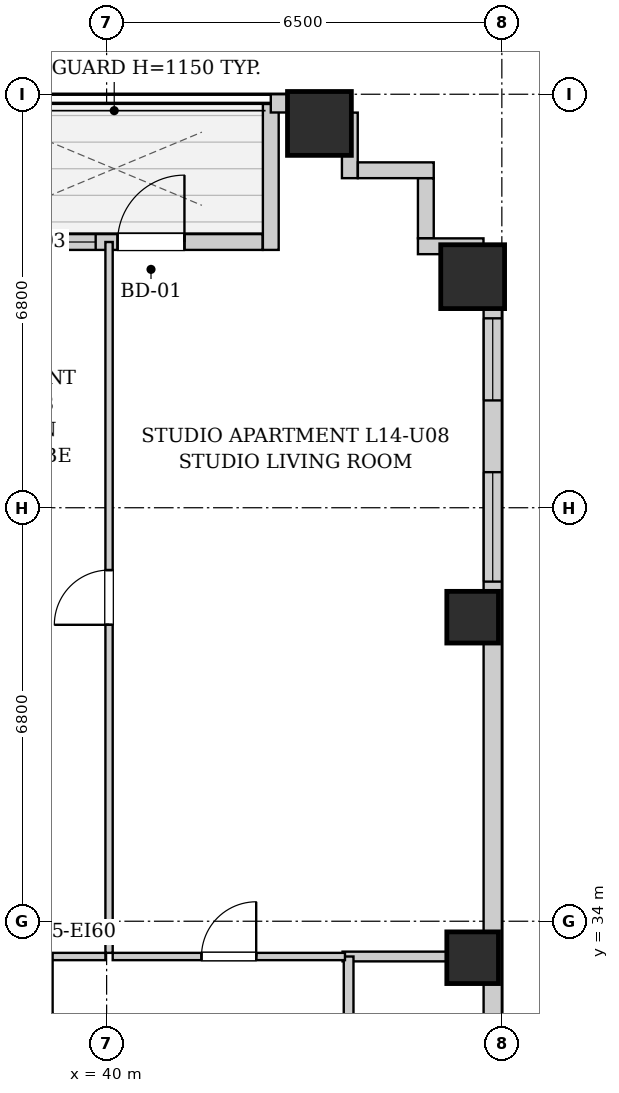
"""IFC4 building model, lengths in metres.
Left out: names, types, materials, properties, quantities, classifications, styles, units other than length and angle.
Written with IfcOpenShell. Run it as: python <this file> out.ifc"""

import sys

from ifc_helpers import new_model, si_unit, direction, frame, frame_2d, origin, origin_2d, place, context, subcontext, project, spatial, rectangle, extrude, element, fill, save


model = new_model("IFC4")
c1 = context("Model", 3, precision=1e-05, world=origin(), true_north=direction((0.0, 1.0)))
c2 = subcontext(c1, "Body", "Model", "MODEL_VIEW")
j1 = project(units=[si_unit("LENGTHUNIT", "METRE"), si_unit("PLANEANGLEUNIT", "RADIAN")], contexts=[c1])
p1 = place(None, origin())
s1 = spatial("IfcSite", under=j1, at=p1, CompositionType="ELEMENT")
p2 = place(p1, origin())
s2 = spatial("IfcBuilding", under=s1, at=p2, CompositionType="ELEMENT")
p3 = place(p2, frame((0.0, 0.0, 54.6)))
s3 = spatial("IfcBuildingStorey", under=s2, at=p3, CompositionType="ELEMENT", Elevation=54.6)
p4 = place(p3, frame((43.5, 47.12, 0.0), z_axis=(0.0, 0.0, 1.0), x_axis=(1.0, 0.0, 0.0)))
e1 = element("IfcColumn", 1, at=p4, inside=s3, PredefinedType="COLUMN", context=c2, shape_type="SweptSolid", body=[
    extrude(rectangle(XDim=1.05, YDim=1.05, at=origin_2d()), origin(), (0.0, 0.0, 1.0), 3.2),
])
for number, where, z_axis, x_axis in (
    (2, (46.02, 33.4, 0.0), (0.0, 0.0, 1.0), (1.0, 0.0, 0.0)),
    (3, (46.02, 39.0, 0.0), (0.0, 0.0, 1.0), (1.0, 0.0, 0.0)),
):
    element("IfcColumn", number, at=place(p3, frame(where, z_axis=z_axis, x_axis=x_axis)), inside=s3, PredefinedType="COLUMN", context=c2, shape_type="SweptSolid", body=[
        extrude(rectangle(XDim=0.85, YDim=0.85, at=origin_2d()), origin(), (0.0, 0.0, 1.0), 3.2),
    ])
p5 = place(p3, frame((46.02, 44.6, 0.0), z_axis=(0.0, 0.0, 1.0), x_axis=(1.0, 0.0, 0.0)))
e4 = element("IfcColumn", 4, at=p5, inside=s3, PredefinedType="COLUMN", context=c2, shape_type="SweptSolid", body=[
    extrude(rectangle(XDim=1.05, YDim=1.05, at=origin_2d()), origin(), (0.0, 0.0, 1.0), 3.2),
])
p6 = place(p3, frame((37.684, 45.17, 0.0), z_axis=(0.0, 0.0, 1.0), x_axis=(1.0, 0.0, 0.0)))
e5 = element("IfcWall", 5, at=p6, inside=s3, PredefinedType="SOLIDWALL", context=c2, shape_type="SweptSolid", body=[
    extrude(rectangle(XDim=4.882, YDim=0.26, at=frame_2d((2.441, 0.0))), origin(), (0.0, 0.0, 1.0), 2.94),
])
p7 = place(p6, frame((2.496, 0.0, 0.0)))
e6 = element("IfcOpeningElement", 6, at=p7, cuts=e5, PredefinedType="OPENING", context=c2, shape_type="SweptSolid", body=[
    extrude(rectangle(XDim=1.1, YDim=2.0, at=frame_2d((0.55, 1.0))), frame((0.0, 0.14, 0.0), z_axis=(0.0, -1.0, 0.0), x_axis=(1.0, 0.0, 0.0)), (0.0, 0.0, 1.0), 0.28),
])
p8 = place(p6, frame((0.336, 0.0, 0.85)))
e7 = element("IfcOpeningElement", 7, at=p8, cuts=e5, PredefinedType="OPENING", context=c2, shape_type="SweptSolid", body=[
    extrude(rectangle(XDim=1.8, YDim=1.65, at=frame_2d((0.9, 0.825))), frame((0.0, 0.14, 0.0), z_axis=(0.0, -1.0, 0.0), x_axis=(1.0, 0.0, 0.0)), (0.0, 0.0, 1.0), 0.28),
])
p9 = place(p3, frame((42.7, 45.04, 0.0), z_axis=(0.0, 0.0, 1.0), x_axis=(0.0, 1.0, 0.0)))
e8 = element("IfcWall", 8, at=p9, inside=s3, PredefinedType="SOLIDWALL", context=c2, shape_type="SweptSolid", body=[
    extrude(rectangle(XDim=2.4, YDim=0.26, at=frame_2d((1.2, 0.0))), origin(), (0.0, 0.0, 1.0), 2.94),
])
p10 = place(p3, frame((42.7, 47.45, 0.0), z_axis=(0.0, 0.0, 1.0), x_axis=(1.0, 0.0, 0.0)))
e9 = element("IfcWall", 9, at=p10, inside=s3, PredefinedType="SOLIDWALL", context=c2, shape_type="SweptSolid", body=[
    extrude(rectangle(XDim=1.3, YDim=0.3, at=frame_2d((0.65, 0.0))), origin(), (0.0, 0.0, 1.0), 1.975),
])
p11 = place(p3, frame((46.35, 45.1, 0.0), z_axis=(0.0, 0.0, 1.0), x_axis=(0.0, -1.0, 0.0)))
e10 = element("IfcWall", 10, at=p11, inside=s3, PredefinedType="SOLIDWALL", context=c2, shape_type="SweptSolid", body=[
    extrude(rectangle(XDim=42.6, YDim=0.3, at=frame_2d((21.3, 0.0))), origin(), (0.0, 0.0, 1.0), 1.975),
])
p12 = place(p11, frame((37.575, 0.0, 0.55)))
e11 = element("IfcOpeningElement", 11, at=p12, cuts=e10, PredefinedType="OPENING", context=c2, shape_type="SweptSolid", body=[
    extrude(rectangle(XDim=1.8, YDim=1.2, at=frame_2d((0.9, 0.6))), frame((0.0, 0.16, 0.0), z_axis=(0.0, -1.0, 0.0), x_axis=(1.0, 0.0, 0.0)), (0.0, 0.0, 1.0), 0.32),
])
p13 = place(p11, frame((34.85, 0.0, 0.55)))
e12 = element("IfcOpeningElement", 12, at=p13, cuts=e10, PredefinedType="OPENING", context=c2, shape_type="SweptSolid", body=[
    extrude(rectangle(XDim=1.35, YDim=1.2, at=frame_2d((0.675, 0.6))), frame((0.0, 0.16, 0.0), z_axis=(0.0, -1.0, 0.0), x_axis=(1.0, 0.0, 0.0)), (0.0, 0.0, 1.0), 0.32),
])
p14 = place(p11, frame((3.715, 0.0, 0.55)))
e13 = element("IfcOpeningElement", 13, at=p14, cuts=e10, PredefinedType="OPENING", context=c2, shape_type="SweptSolid", body=[
    extrude(rectangle(XDim=1.8, YDim=1.2, at=frame_2d((0.9, 0.6))), frame((0.0, 0.16, 0.0), z_axis=(0.0, -1.0, 0.0), x_axis=(1.0, 0.0, 0.0)), (0.0, 0.0, 1.0), 0.32),
])
p15 = place(p11, frame((1.185, 0.0, 0.55)))
e14 = element("IfcOpeningElement", 14, at=p15, cuts=e10, PredefinedType="OPENING", context=c2, shape_type="SweptSolid", body=[
    extrude(rectangle(XDim=1.35, YDim=1.2, at=frame_2d((0.675, 0.6))), frame((0.0, 0.16, 0.0), z_axis=(0.0, -1.0, 0.0), x_axis=(1.0, 0.0, 0.0)), (0.0, 0.0, 1.0), 0.32),
])
p16 = place(p11, frame((26.025, 0.0, 0.55)))
e15 = element("IfcOpeningElement", 15, at=p16, cuts=e10, PredefinedType="OPENING", context=c2, shape_type="SweptSolid", body=[
    extrude(rectangle(XDim=1.8, YDim=1.2, at=frame_2d((0.9, 0.6))), frame((0.0, 0.16, 0.0), z_axis=(0.0, -1.0, 0.0), x_axis=(1.0, 0.0, 0.0)), (0.0, 0.0, 1.0), 0.32),
])
p17 = place(p11, frame((28.085, 0.0, 0.55)))
e16 = element("IfcOpeningElement", 16, at=p17, cuts=e10, PredefinedType="OPENING", context=c2, shape_type="SweptSolid", body=[
    extrude(rectangle(XDim=1.35, YDim=1.2, at=frame_2d((0.675, 0.6))), frame((0.0, 0.16, 0.0), z_axis=(0.0, -1.0, 0.0), x_axis=(1.0, 0.0, 0.0)), (0.0, 0.0, 1.0), 0.32),
])
p18 = place(p11, frame((18.8, 0.0, 0.55)))
e17 = element("IfcOpeningElement", 17, at=p18, cuts=e10, PredefinedType="OPENING", context=c2, shape_type="SweptSolid", body=[
    extrude(rectangle(XDim=1.8, YDim=1.2, at=frame_2d((0.9, 0.6))), frame((0.0, 0.16, 0.0), z_axis=(0.0, -1.0, 0.0), x_axis=(1.0, 0.0, 0.0)), (0.0, 0.0, 1.0), 0.32),
])
p19 = place(p11, frame((16.685, 0.0, 0.55)))
e18 = element("IfcOpeningElement", 18, at=p19, cuts=e10, PredefinedType="OPENING", context=c2, shape_type="SweptSolid", body=[
    extrude(rectangle(XDim=1.35, YDim=1.2, at=frame_2d((0.675, 0.6))), frame((0.0, 0.16, 0.0), z_axis=(0.0, -1.0, 0.0), x_axis=(1.0, 0.0, 0.0)), (0.0, 0.0, 1.0), 0.32),
])
p20 = place(p3, frame((44.0, 47.298, 0.0), z_axis=(0.0, 0.0, 1.0), x_axis=(0.0, -1.0, 0.0)))
e19 = element("IfcWall", 19, at=p20, inside=s3, PredefinedType="SOLIDWALL", context=c2, shape_type="SweptSolid", body=[
    extrude(rectangle(XDim=1.078, YDim=0.26, at=frame_2d((0.539, 0.0))), origin(), (0.0, 0.0, 1.0), 2.94),
])
p21 = place(p3, frame((44.132, 46.35, 0.0), z_axis=(0.0, 0.0, 1.0), x_axis=(1.0, 0.0, 0.0)))
e20 = element("IfcWall", 20, at=p21, inside=s3, PredefinedType="SOLIDWALL", context=c2, shape_type="SweptSolid", body=[
    extrude(rectangle(XDim=1.248, YDim=0.26, at=frame_2d((0.624, 0.0))), origin(), (0.0, 0.0, 1.0), 2.94),
])
p22 = place(p3, frame((45.25, 46.218, 0.0), z_axis=(0.0, 0.0, 1.0), x_axis=(0.0, -1.0, 0.0)))
e21 = element("IfcWall", 21, at=p22, inside=s3, PredefinedType="SOLIDWALL", context=c2, shape_type="SweptSolid", body=[
    extrude(rectangle(XDim=0.986, YDim=0.26, at=frame_2d((0.493, 0.0))), origin(), (0.0, 0.0, 1.0), 2.94),
])
p23 = place(p3, frame((45.12, 45.1, 0.0), z_axis=(0.0, 0.0, 1.0), x_axis=(1.0, 0.0, 0.0)))
e22 = element("IfcWall", 22, at=p23, inside=s3, PredefinedType="SOLIDWALL", context=c2, shape_type="SweptSolid", body=[
    extrude(rectangle(XDim=1.078, YDim=0.26, at=frame_2d((0.539, 0.0))), origin(), (0.0, 0.0, 1.0), 2.94),
])
p24 = place(p3, frame((43.88, 33.42, 0.0), z_axis=(0.0, 0.0, 1.0), x_axis=(1.0, 0.0, 0.0)))
e23 = element("IfcWall", 23, at=p24, inside=s3, PredefinedType="PARTITIONING", context=c2, shape_type="SweptSolid", body=[
    extrude(rectangle(XDim=2.34, YDim=0.16, at=frame_2d((1.17, 0.0))), origin(), (0.0, 0.0, 1.0), 2.94),
])
p25 = place(p3, frame((43.98, 30.76, 0.0), z_axis=(0.0, 0.0, 1.0), x_axis=(0.0, 1.0, 0.0)))
e24 = element("IfcWall", 24, at=p25, inside=s3, PredefinedType="PARTITIONING", context=c2, shape_type="SweptSolid", body=[
    extrude(rectangle(XDim=2.66, YDim=0.16, at=frame_2d((1.33, 0.0))), origin(), (0.0, 0.0, 1.0), 2.94),
])
p26 = place(p3, frame((39.052, 30.76, 0.0), z_axis=(0.0, 0.0, 1.0), x_axis=(0.0, 1.0, 0.0)))
e25 = element("IfcWall", 25, at=p26, inside=s3, PredefinedType="PARTITIONING", context=c2, shape_type="SweptSolid", body=[
    extrude(rectangle(XDim=2.6, YDim=0.12, at=frame_2d((1.3, 0.0))), origin(), (0.0, 0.0, 1.0), 2.94),
])
p27 = place(p26, frame((0.87, 0.0, 0.0)))
e26 = element("IfcOpeningElement", 26, at=p27, cuts=e25, PredefinedType="OPENING", context=c2, shape_type="SweptSolid", body=[
    extrude(rectangle(XDim=0.86, YDim=2.05, at=frame_2d((0.43, 1.025))), frame((0.0, 0.07, 0.0), z_axis=(0.0, -1.0, 0.0), x_axis=(1.0, 0.0, 0.0)), (0.0, 0.0, 1.0), 0.14),
])
p28 = place(p3, frame((39.112, 33.42, 0.0), z_axis=(0.0, 0.0, 1.0), x_axis=(1.0, 0.0, 0.0)))
e27 = element("IfcWall", 27, at=p28, inside=s3, PredefinedType="PARTITIONING", context=c2, shape_type="SweptSolid", body=[
    extrude(rectangle(XDim=0.868, YDim=0.12, at=frame_2d((0.434, 0.0))), origin(), (0.0, 0.0, 1.0), 2.94),
])
p29 = place(p3, frame((40.1, 33.42, 0.0), z_axis=(0.0, 0.0, 1.0), x_axis=(1.0, 0.0, 0.0)))
e28 = element("IfcWall", 28, at=p29, inside=s3, PredefinedType="PARTITIONING", context=c2, shape_type="SweptSolid", body=[
    extrude(rectangle(XDim=3.82, YDim=0.12, at=frame_2d((1.91, 0.0))), origin(), (0.0, 0.0, 1.0), 2.94),
])
p30 = place(p29, frame((1.46, 0.0, 0.0)))
e29 = element("IfcOpeningElement", 29, at=p30, cuts=e28, PredefinedType="OPENING", context=c2, shape_type="SweptSolid", body=[
    extrude(rectangle(XDim=0.9, YDim=2.05, at=frame_2d((0.45, 1.025))), frame((0.0, 0.07, 0.0), z_axis=(0.0, -1.0, 0.0), x_axis=(1.0, 0.0, 0.0)), (0.0, 0.0, 1.0), 0.14),
])
p31 = place(p3, frame((40.04, 33.48, 0.0), z_axis=(0.0, 0.0, 1.0), x_axis=(0.0, 1.0, 0.0)))
e30 = element("IfcWall", 30, at=p31, inside=s3, PredefinedType="PARTITIONING", context=c2, shape_type="SweptSolid", body=[
    extrude(rectangle(XDim=11.69, YDim=0.12, at=frame_2d((5.845, 0.0))), origin(), (0.0, 0.0, 1.0), 2.94),
])
p32 = place(p31, frame((5.395, 0.0, 0.0)))
e31 = element("IfcOpeningElement", 31, at=p32, cuts=e30, PredefinedType="OPENING", context=c2, shape_type="SweptSolid", body=[
    extrude(rectangle(XDim=0.9, YDim=2.05, at=frame_2d((0.45, 1.025))), frame((0.0, 0.07, 0.0), z_axis=(0.0, -1.0, 0.0), x_axis=(1.0, 0.0, 0.0)), (0.0, 0.0, 1.0), 0.14),
])
p33 = place(p30, origin())
e32 = element("IfcDoor", 32, at=p33, inside=s3, OperationType="SINGLE_SWING_RIGHT", PredefinedType="DOOR", context=c2, shape_type="SweptSolid", body=[
    extrude(rectangle(XDim=0.9, YDim=2.05, at=frame_2d((0.45, 1.025))), frame((0.0, 0.025, 0.0), z_axis=(0.0, -1.0, 0.0), x_axis=(1.0, 0.0, 0.0)), (0.0, 0.0, 1.0), 0.05),
])
fill(e29, e32)
p34 = place(p32, origin())
e33 = element("IfcDoor", 33, at=p34, inside=s3, OperationType="SINGLE_SWING_LEFT", PredefinedType="DOOR", context=c2, shape_type="SweptSolid", body=[
    extrude(rectangle(XDim=0.9, YDim=2.05, at=frame_2d((0.45, 1.025))), frame((0.0, 0.025, 0.0), z_axis=(0.0, -1.0, 0.0), x_axis=(1.0, 0.0, 0.0)), (0.0, 0.0, 1.0), 0.05),
])
fill(e31, e33)
p35 = place(p7, origin())
e34 = element("IfcDoor", 34, at=p35, inside=s3, OperationType="SINGLE_SWING_RIGHT", PredefinedType="DOOR", context=c2, shape_type="SweptSolid", body=[
    extrude(rectangle(XDim=1.1, YDim=2.0, at=frame_2d((0.55, 1.0))), frame((0.0, 0.025, 0.0), z_axis=(0.0, -1.0, 0.0), x_axis=(1.0, 0.0, 0.0)), (0.0, 0.0, 1.0), 0.05),
])
fill(e6, e34)
p36 = place(p8, origin())
e35 = element("IfcWindow", 35, at=p36, inside=s3, PartitioningType="DOUBLE_PANEL_VERTICAL", PredefinedType="WINDOW", context=c2, shape_type="SweptSolid", body=[
    extrude(rectangle(XDim=1.8, YDim=1.65, at=frame_2d((0.9, 0.825))), frame((0.0, 0.03, 0.0), z_axis=(0.0, -1.0, 0.0), x_axis=(1.0, 0.0, 0.0)), (0.0, 0.0, 1.0), 0.06),
])
fill(e7, e35)
p37 = place(p14, origin())
e36 = element("IfcWindow", 36, at=p37, inside=s3, PartitioningType="DOUBLE_PANEL_VERTICAL", PredefinedType="WINDOW", context=c2, shape_type="SweptSolid", body=[
    extrude(rectangle(XDim=1.8, YDim=1.2, at=frame_2d((0.9, 0.6))), frame((0.0, 0.03, 0.0), z_axis=(0.0, -1.0, 0.0), x_axis=(1.0, 0.0, 0.0)), (0.0, 0.0, 1.0), 0.06),
])
fill(e13, e36)
p38 = place(p15, origin())
e37 = element("IfcWindow", 37, at=p38, inside=s3, PartitioningType="SINGLE_PANEL", PredefinedType="WINDOW", context=c2, shape_type="SweptSolid", body=[
    extrude(rectangle(XDim=1.35, YDim=1.2, at=frame_2d((0.675, 0.6))), frame((0.0, 0.03, 0.0), z_axis=(0.0, -1.0, 0.0), x_axis=(1.0, 0.0, 0.0)), (0.0, 0.0, 1.0), 0.06),
])
fill(e14, e37)
save(model, sys.argv[1])
